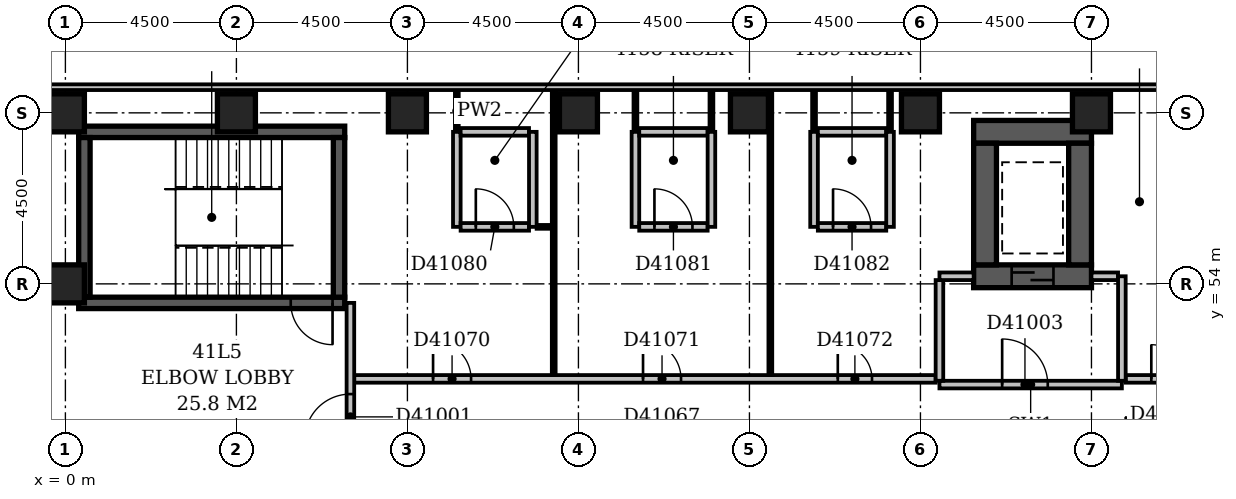
"""IFC4 building model, lengths in metres.
Left out: names, types, materials, properties, quantities, classifications, styles, units other than length and angle.
Written with IfcOpenShell. Run it as: python <this file> out.ifc"""

import sys

from ifc_helpers import new_model, si_unit, direction, frame, frame_2d, origin, origin_2d, place, context, subcontext, project, spatial, rectangle, extrude, element, fill, save


model = new_model("IFC4")
c1 = context("Model", 3, precision=1e-05, world=origin(), true_north=direction((0.0, 1.0)))
c2 = subcontext(c1, "Body", "Model", "MODEL_VIEW")
j1 = project(units=[si_unit("LENGTHUNIT", "METRE"), si_unit("PLANEANGLEUNIT", "RADIAN")], contexts=[c1])
p1 = place(None, origin())
s1 = spatial("IfcSite", under=j1, at=p1, CompositionType="ELEMENT")
p2 = place(p1, origin())
s2 = spatial("IfcBuilding", under=s1, at=p2, CompositionType="ELEMENT")
p3 = place(p2, frame((0.0, 0.0, 162.8)))
s3 = spatial("IfcBuildingStorey", under=s2, at=p3, CompositionType="ELEMENT", Elevation=162.8)
p4 = place(p3, frame((0.35, 53.5, -0.3), z_axis=(0.0, 0.0, 1.0), x_axis=(1.0, 0.0, 0.0)))
e1 = element("IfcWall", 1, at=p4, inside=s3, PredefinedType="SHEAR", context=c2, shape_type="SweptSolid", body=[
    extrude(rectangle(XDim=7.0, YDim=0.3, at=frame_2d((3.5, 0.0))), origin(), (0.0, 0.0, 1.0), 3.6),
])
p5 = place(p4, frame((5.58, 0.0, 0.3)))
e2 = element("IfcOpeningElement", 2, at=p5, cuts=e1, PredefinedType="OPENING", context=c2, shape_type="SweptSolid", body=[
    extrude(rectangle(XDim=1.1, YDim=2.1, at=frame_2d((0.55, 1.05))), frame((0.0, 0.162, 0.0), z_axis=(0.0, -1.0, 0.0), x_axis=(1.0, 0.0, 0.0)), (0.0, 0.0, 1.0), 0.324),
])
p6 = place(p3, frame((0.35, 58.0, -0.3), z_axis=(0.0, 0.0, 1.0), x_axis=(1.0, 0.0, 0.0)))
e3 = element("IfcWall", 3, at=p6, inside=s3, PredefinedType="SHEAR", context=c2, shape_type="SweptSolid", body=[
    extrude(rectangle(XDim=7.0, YDim=0.3, at=frame_2d((3.5, 0.0))), origin(), (0.0, 0.0, 1.0), 3.6),
])
for number, where, z_axis, x_axis in (
    (4, (0.5, 53.65, -0.3), (0.0, 0.0, 1.0), (0.0, 1.0, 0.0)),
    (5, (7.2, 53.65, -0.3), (0.0, 0.0, 1.0), (0.0, 1.0, 0.0)),
):
    element("IfcWall", number, at=place(p3, frame(where, z_axis=z_axis, x_axis=x_axis)), inside=s3, PredefinedType="SHEAR", context=c2, shape_type="SweptSolid", body=[
        extrude(rectangle(XDim=4.2, YDim=0.3, at=frame_2d((2.1, 0.0))), origin(), (0.0, 0.0, 1.0), 3.6),
    ])
p7 = place(p3, frame((23.9, 54.2, -0.3), z_axis=(0.0, 0.0, 1.0), x_axis=(1.0, 0.0, 0.0)))
e6 = element("IfcWall", 6, at=p7, inside=s3, PredefinedType="SHEAR", context=c2, shape_type="SweptSolid", body=[
    extrude(rectangle(XDim=3.1, YDim=0.6, at=frame_2d((1.55, 0.0))), origin(), (0.0, 0.0, 1.0), 3.6),
])
p8 = place(p7, frame((1.0, 0.0, 0.3)))
e7 = element("IfcOpeningElement", 7, at=p8, cuts=e6, PredefinedType="OPENING", context=c2, shape_type="SweptSolid", body=[
    extrude(rectangle(XDim=1.1, YDim=2.1, at=frame_2d((0.55, 1.05))), frame((0.0, 0.312, 0.0), z_axis=(0.0, -1.0, 0.0), x_axis=(1.0, 0.0, 0.0)), (0.0, 0.0, 1.0), 0.624),
])
p9 = place(p3, frame((23.9, 58.0, -0.3), z_axis=(0.0, 0.0, 1.0), x_axis=(1.0, 0.0, 0.0)))
e8 = element("IfcWall", 8, at=p9, inside=s3, PredefinedType="SHEAR", context=c2, shape_type="SweptSolid", body=[
    extrude(rectangle(XDim=3.1, YDim=0.6, at=frame_2d((1.55, 0.0))), origin(), (0.0, 0.0, 1.0), 3.6),
])
for number, where, z_axis, x_axis in (
    (9, (24.2, 54.5, -0.3), (0.0, 0.0, 1.0), (0.0, 1.0, 0.0)),
    (10, (26.7, 54.5, -0.3), (0.0, 0.0, 1.0), (0.0, 1.0, 0.0)),
):
    element("IfcWall", number, at=place(p3, frame(where, z_axis=z_axis, x_axis=x_axis)), inside=s3, PredefinedType="SHEAR", context=c2, shape_type="SweptSolid", body=[
        extrude(rectangle(XDim=3.2, YDim=0.6, at=frame_2d((1.6, 0.0))), origin(), (0.0, 0.0, 1.0), 3.6),
    ])
for number, where, z_axis, x_axis in (
    (11, (0.0, 54.0, -0.3), (0.0, 0.0, 1.0), (1.0, 0.0, 0.0)),
    (12, (0.0, 58.5, -0.3), (0.0, 0.0, 1.0), (1.0, 0.0, 0.0)),
    (13, (4.5, 58.5, -0.3), (0.0, 0.0, 1.0), (1.0, 0.0, 0.0)),
    (14, (9.0, 58.5, -0.3), (0.0, 0.0, 1.0), (1.0, 0.0, 0.0)),
    (15, (13.5, 58.5, -0.3), (0.0, 0.0, 1.0), (1.0, 0.0, 0.0)),
    (16, (18.0, 58.5, -0.3), (0.0, 0.0, 1.0), (1.0, 0.0, 0.0)),
    (17, (22.5, 58.5, -0.3), (0.0, 0.0, 1.0), (1.0, 0.0, 0.0)),
    (18, (27.0, 58.5, -0.3), (0.0, 0.0, 1.0), (1.0, 0.0, 0.0)),
):
    element("IfcColumn", number, at=place(p3, frame(where, z_axis=z_axis, x_axis=x_axis)), inside=s3, PredefinedType="COLUMN", context=c2, shape_type="SweptSolid", body=[
        extrude(rectangle(XDim=1.0, YDim=1.0, at=origin_2d()), origin(), (0.0, 0.0, 1.0), 3.6),
    ])
p10 = place(p3, frame((68.1, 59.175, 0.0), z_axis=(0.0, 0.0, 1.0), x_axis=(-1.0, 0.0, 0.0)))
e19 = element("IfcWall", 19, at=p10, inside=s3, PredefinedType="STANDARD", context=c2, shape_type="SweptSolid", body=[
    extrude(rectangle(XDim=68.85, YDim=0.15, at=frame_2d((34.425, 0.0))), origin(), (0.0, 0.0, 1.0), 2.7),
])
p11 = place(p10, frame((1.65, 0.0, 0.6)))
e20 = element("IfcOpeningElement", 20, at=p11, cuts=e19, PredefinedType="OPENING", context=c2, shape_type="SweptSolid", body=[
    extrude(rectangle(XDim=2.4, YDim=1.8, at=frame_2d((1.2, 0.9))), frame((0.0, 0.087, 0.0), z_axis=(0.0, -1.0, 0.0), x_axis=(1.0, 0.0, 0.0)), (0.0, 0.0, 1.0), 0.174),
])
p12 = place(p10, frame((6.15, 0.0, 0.6)))
e21 = element("IfcOpeningElement", 21, at=p12, cuts=e19, PredefinedType="OPENING", context=c2, shape_type="SweptSolid", body=[
    extrude(rectangle(XDim=2.4, YDim=1.8, at=frame_2d((1.2, 0.9))), frame((0.0, 0.087, 0.0), z_axis=(0.0, -1.0, 0.0), x_axis=(1.0, 0.0, 0.0)), (0.0, 0.0, 1.0), 0.174),
])
p13 = place(p10, frame((37.78, 0.0, 0.6)))
e22 = element("IfcOpeningElement", 22, at=p13, cuts=e19, PredefinedType="OPENING", context=c2, shape_type="SweptSolid", body=[
    extrude(rectangle(XDim=1.2, YDim=1.8, at=frame_2d((0.6, 0.9))), frame((0.0, 0.087, 0.0), z_axis=(0.0, -1.0, 0.0), x_axis=(1.0, 0.0, 0.0)), (0.0, 0.0, 1.0), 0.174),
])
p14 = place(p3, frame((23.0, 51.35, 0.0), z_axis=(0.0, 0.0, 1.0), x_axis=(1.0, 0.0, 0.0)))
e23 = element("IfcWall", 23, at=p14, inside=s3, PredefinedType="PARTITIONING", context=c2, shape_type="SweptSolid", body=[
    extrude(rectangle(XDim=4.8, YDim=0.2, at=frame_2d((2.4, 0.0))), origin(), (0.0, 0.0, 1.0), 3.3),
])
p15 = place(p14, frame((1.65, 0.0, 0.0)))
e24 = element("IfcOpeningElement", 24, at=p15, cuts=e23, PredefinedType="OPENING", context=c2, shape_type="SweptSolid", body=[
    extrude(rectangle(XDim=1.2, YDim=2.1, at=frame_2d((0.6, 1.05))), frame((0.0, 0.112, 0.0), z_axis=(0.0, -1.0, 0.0), x_axis=(1.0, 0.0, 0.0)), (0.0, 0.0, 1.0), 0.224),
])
p16 = place(p3, frame((27.8, 51.45, 0.0), z_axis=(0.0, 0.0, 1.0), x_axis=(0.0, 1.0, 0.0)))
e25 = element("IfcWall", 25, at=p16, inside=s3, PredefinedType="PARTITIONING", context=c2, shape_type="SweptSolid", body=[
    extrude(rectangle(XDim=2.75, YDim=0.2, at=frame_2d((1.375, 0.0))), origin(), (0.0, 0.0, 1.0), 3.3),
])
p17 = place(p3, frame((23.0, 54.2, 0.0), z_axis=(0.0, 0.0, 1.0), x_axis=(1.0, 0.0, 0.0)))
e26 = element("IfcWall", 26, at=p17, inside=s3, PredefinedType="PARTITIONING", context=c2, shape_type="SweptSolid", body=[
    extrude(rectangle(XDim=0.9, YDim=0.2, at=frame_2d((0.45, 0.0))), origin(), (0.0, 0.0, 1.0), 3.3),
])
p18 = place(p3, frame((27.0, 54.2, 0.0), z_axis=(0.0, 0.0, 1.0), x_axis=(1.0, 0.0, 0.0)))
e27 = element("IfcWall", 27, at=p18, inside=s3, PredefinedType="PARTITIONING", context=c2, shape_type="SweptSolid", body=[
    extrude(rectangle(XDim=0.7, YDim=0.2, at=frame_2d((0.35, 0.0))), origin(), (0.0, 0.0, 1.0), 3.3),
])
p19 = place(p3, frame((23.0, 51.45, 0.0), z_axis=(0.0, 0.0, 1.0), x_axis=(0.0, 1.0, 0.0)))
e28 = element("IfcWall", 28, at=p19, inside=s3, PredefinedType="PARTITIONING", context=c2, shape_type="SweptSolid", body=[
    extrude(rectangle(XDim=2.65, YDim=0.2, at=frame_2d((1.325, 0.0))), origin(), (0.0, 0.0, 1.0), 3.3),
])
p20 = place(p3, frame((7.5, 49.6, 0.0), z_axis=(0.0, 0.0, 1.0), x_axis=(0.0, 1.0, 0.0)))
e29 = element("IfcWall", 29, at=p20, inside=s3, PredefinedType="PARTITIONING", context=c2, shape_type="SweptSolid", body=[
    extrude(rectangle(XDim=3.9, YDim=0.2, at=frame_2d((1.95, 0.0))), origin(), (0.0, 0.0, 1.0), 3.3),
])
p21 = place(p20, frame((0.3, 0.0, 0.0)))
e30 = element("IfcOpeningElement", 30, at=p21, cuts=e29, PredefinedType="OPENING", context=c2, shape_type="SweptSolid", body=[
    extrude(rectangle(XDim=1.2, YDim=2.1, at=frame_2d((0.6, 1.05))), frame((0.0, 0.112, 0.0), z_axis=(0.0, -1.0, 0.0), x_axis=(1.0, 0.0, 0.0)), (0.0, 0.0, 1.0), 0.224),
])
p22 = place(p3, frame((7.6, 51.5, 0.0), z_axis=(0.0, 0.0, 1.0), x_axis=(1.0, 0.0, 0.0)))
e31 = element("IfcWall", 31, at=p22, inside=s3, PredefinedType="PARTITIONING", context=c2, shape_type="SweptSolid", body=[
    extrude(rectangle(XDim=15.3, YDim=0.2, at=frame_2d((7.65, 0.0))), origin(), (0.0, 0.0, 1.0), 3.3),
])
p23 = place(p22, frame((2.075, 0.0, 0.0)))
e32 = element("IfcOpeningElement", 32, at=p23, cuts=e31, PredefinedType="OPENING", context=c2, shape_type="SweptSolid", body=[
    extrude(rectangle(XDim=1.0, YDim=2.1, at=frame_2d((0.5, 1.05))), frame((0.0, 0.112, 0.0), z_axis=(0.0, -1.0, 0.0), x_axis=(1.0, 0.0, 0.0)), (0.0, 0.0, 1.0), 0.224),
])
p24 = place(p22, frame((7.6, 0.0, 0.0)))
e33 = element("IfcOpeningElement", 33, at=p24, cuts=e31, PredefinedType="OPENING", context=c2, shape_type="SweptSolid", body=[
    extrude(rectangle(XDim=1.0, YDim=2.1, at=frame_2d((0.5, 1.05))), frame((0.0, 0.112, 0.0), z_axis=(0.0, -1.0, 0.0), x_axis=(1.0, 0.0, 0.0)), (0.0, 0.0, 1.0), 0.224),
])
p25 = place(p22, frame((12.725, 0.0, 0.0)))
e34 = element("IfcOpeningElement", 34, at=p25, cuts=e31, PredefinedType="OPENING", context=c2, shape_type="SweptSolid", body=[
    extrude(rectangle(XDim=0.9, YDim=2.1, at=frame_2d((0.45, 1.05))), frame((0.0, 0.112, 0.0), z_axis=(0.0, -1.0, 0.0), x_axis=(1.0, 0.0, 0.0)), (0.0, 0.0, 1.0), 0.224),
])
p26 = place(p3, frame((27.9, 51.5, 0.0), z_axis=(0.0, 0.0, 1.0), x_axis=(1.0, 0.0, 0.0)))
e35 = element("IfcWall", 35, at=p26, inside=s3, PredefinedType="PARTITIONING", context=c2, shape_type="SweptSolid", body=[
    extrude(rectangle(XDim=9.3, YDim=0.2, at=frame_2d((4.65, 0.0))), origin(), (0.0, 0.0, 1.0), 3.3),
])
p27 = place(p26, frame((0.675, 0.0, 0.0)))
e36 = element("IfcOpeningElement", 36, at=p27, cuts=e35, PredefinedType="OPENING", context=c2, shape_type="SweptSolid", body=[
    extrude(rectangle(XDim=0.9, YDim=2.1, at=frame_2d((0.45, 1.05))), frame((0.0, 0.112, 0.0), z_axis=(0.0, -1.0, 0.0), x_axis=(1.0, 0.0, 0.0)), (0.0, 0.0, 1.0), 0.224),
])
p28 = place(p26, frame((3.6, 0.0, 0.0)))
e37 = element("IfcOpeningElement", 37, at=p28, cuts=e35, PredefinedType="OPENING", context=c2, shape_type="SweptSolid", body=[
    extrude(rectangle(XDim=1.0, YDim=2.1, at=frame_2d((0.5, 1.05))), frame((0.0, 0.112, 0.0), z_axis=(0.0, -1.0, 0.0), x_axis=(1.0, 0.0, 0.0)), (0.0, 0.0, 1.0), 0.224),
])
p29 = place(p26, frame((7.125, 0.0, 0.0)))
e38 = element("IfcOpeningElement", 38, at=p29, cuts=e35, PredefinedType="OPENING", context=c2, shape_type="SweptSolid", body=[
    extrude(rectangle(XDim=1.0, YDim=2.1, at=frame_2d((0.5, 1.05))), frame((0.0, 0.112, 0.0), z_axis=(0.0, -1.0, 0.0), x_axis=(1.0, 0.0, 0.0)), (0.0, 0.0, 1.0), 0.224),
])
for number, where, z_axis, x_axis in (
    (39, (12.85, 51.6, 0.0), (0.0, 0.0, 1.0), (0.0, 1.0, 0.0)),
    (40, (18.55, 51.6, 0.0), (0.0, 0.0, 1.0), (0.0, 1.0, 0.0)),
):
    element("IfcWall", number, at=place(p3, frame(where, z_axis=z_axis, x_axis=x_axis)), inside=s3, PredefinedType="PARTITIONING", context=c2, shape_type="SweptSolid", body=[
        extrude(rectangle(XDim=7.5, YDim=0.1, at=frame_2d((3.75, 0.0))), origin(), (0.0, 0.0, 1.0), 3.3),
    ])
p30 = place(p3, frame((10.3, 55.5, 0.0), z_axis=(0.0, 0.0, 1.0), x_axis=(0.0, 1.0, 0.0)))
e41 = element("IfcWall", 41, at=p30, inside=s3, PredefinedType="PARTITIONING", context=c2, shape_type="SweptSolid", body=[
    extrude(rectangle(XDim=2.5, YDim=0.2, at=frame_2d((1.25, 0.0))), origin(), (0.0, 0.0, 1.0), 3.3),
])
p31 = place(p3, frame((10.4, 55.5, 0.0), z_axis=(0.0, 0.0, 1.0), x_axis=(1.0, 0.0, 0.0)))
e42 = element("IfcWall", 42, at=p31, inside=s3, PredefinedType="PARTITIONING", context=c2, shape_type="SweptSolid", body=[
    extrude(rectangle(XDim=1.8, YDim=0.2, at=frame_2d((0.9, 0.0))), origin(), (0.0, 0.0, 1.0), 3.3),
])
p32 = place(p31, frame((0.4, 0.0, 0.0)))
e43 = element("IfcOpeningElement", 43, at=p32, cuts=e42, PredefinedType="OPENING", context=c2, shape_type="SweptSolid", body=[
    extrude(rectangle(XDim=1.0, YDim=2.1, at=frame_2d((0.5, 1.05))), frame((0.0, 0.112, 0.0), z_axis=(0.0, -1.0, 0.0), x_axis=(1.0, 0.0, 0.0)), (0.0, 0.0, 1.0), 0.224),
])
p33 = place(p3, frame((12.3, 55.5, 0.0), z_axis=(0.0, 0.0, 1.0), x_axis=(0.0, 1.0, 0.0)))
e44 = element("IfcWall", 44, at=p33, inside=s3, PredefinedType="PARTITIONING", context=c2, shape_type="SweptSolid", body=[
    extrude(rectangle(XDim=2.5, YDim=0.2, at=frame_2d((1.25, 0.0))), origin(), (0.0, 0.0, 1.0), 3.3),
])
p34 = place(p3, frame((12.4, 55.5, 0.0), z_axis=(0.0, 0.0, 1.0), x_axis=(1.0, 0.0, 0.0)))
e45 = element("IfcWall", 45, at=p34, inside=s3, PredefinedType="PARTITIONING", context=c2, shape_type="SweptSolid", body=[
    extrude(rectangle(XDim=0.4, YDim=0.1, at=frame_2d((0.2, 0.0))), origin(), (0.0, 0.0, 1.0), 3.3),
])
p35 = place(p3, frame((15.0, 55.5, 0.0), z_axis=(0.0, 0.0, 1.0), x_axis=(0.0, 1.0, 0.0)))
e46 = element("IfcWall", 46, at=p35, inside=s3, PredefinedType="PARTITIONING", context=c2, shape_type="SweptSolid", body=[
    extrude(rectangle(XDim=2.5, YDim=0.2, at=frame_2d((1.25, 0.0))), origin(), (0.0, 0.0, 1.0), 3.3),
])
p36 = place(p3, frame((15.1, 55.5, 0.0), z_axis=(0.0, 0.0, 1.0), x_axis=(1.0, 0.0, 0.0)))
e47 = element("IfcWall", 47, at=p36, inside=s3, PredefinedType="PARTITIONING", context=c2, shape_type="SweptSolid", body=[
    extrude(rectangle(XDim=1.8, YDim=0.2, at=frame_2d((0.9, 0.0))), origin(), (0.0, 0.0, 1.0), 3.3),
])
p37 = place(p36, frame((0.4, 0.0, 0.0)))
e48 = element("IfcOpeningElement", 48, at=p37, cuts=e47, PredefinedType="OPENING", context=c2, shape_type="SweptSolid", body=[
    extrude(rectangle(XDim=1.0, YDim=2.1, at=frame_2d((0.5, 1.05))), frame((0.0, 0.112, 0.0), z_axis=(0.0, -1.0, 0.0), x_axis=(1.0, 0.0, 0.0)), (0.0, 0.0, 1.0), 0.224),
])
for number, where, z_axis, x_axis in (
    (49, (17.0, 55.5, 0.0), (0.0, 0.0, 1.0), (0.0, 1.0, 0.0)),
    (50, (19.7, 55.5, 0.0), (0.0, 0.0, 1.0), (0.0, 1.0, 0.0)),
):
    element("IfcWall", number, at=place(p3, frame(where, z_axis=z_axis, x_axis=x_axis)), inside=s3, PredefinedType="PARTITIONING", context=c2, shape_type="SweptSolid", body=[
        extrude(rectangle(XDim=2.5, YDim=0.2, at=frame_2d((1.25, 0.0))), origin(), (0.0, 0.0, 1.0), 3.3),
    ])
p38 = place(p3, frame((19.8, 55.5, 0.0), z_axis=(0.0, 0.0, 1.0), x_axis=(1.0, 0.0, 0.0)))
e51 = element("IfcWall", 51, at=p38, inside=s3, PredefinedType="PARTITIONING", context=c2, shape_type="SweptSolid", body=[
    extrude(rectangle(XDim=1.8, YDim=0.2, at=frame_2d((0.9, 0.0))), origin(), (0.0, 0.0, 1.0), 3.3),
])
p39 = place(p38, frame((0.4, 0.0, 0.0)))
e52 = element("IfcOpeningElement", 52, at=p39, cuts=e51, PredefinedType="OPENING", context=c2, shape_type="SweptSolid", body=[
    extrude(rectangle(XDim=1.0, YDim=2.1, at=frame_2d((0.5, 1.05))), frame((0.0, 0.112, 0.0), z_axis=(0.0, -1.0, 0.0), x_axis=(1.0, 0.0, 0.0)), (0.0, 0.0, 1.0), 0.224),
])
p40 = place(p3, frame((21.7, 55.5, 0.0), z_axis=(0.0, 0.0, 1.0), x_axis=(0.0, 1.0, 0.0)))
e53 = element("IfcWall", 53, at=p40, inside=s3, PredefinedType="PARTITIONING", context=c2, shape_type="SweptSolid", body=[
    extrude(rectangle(XDim=2.5, YDim=0.2, at=frame_2d((1.25, 0.0))), origin(), (0.0, 0.0, 1.0), 3.3),
])
p41 = place(p3, frame((10.3, 58.0, 0.0), z_axis=(0.0, 0.0, 1.0), x_axis=(0.0, 1.0, 0.0)))
e54 = element("IfcWall", 54, at=p41, inside=s3, PredefinedType="PARTITIONING", context=c2, shape_type="SweptSolid", body=[
    extrude(rectangle(XDim=1.1, YDim=0.1, at=frame_2d((0.55, 0.0))), origin(), (0.0, 0.0, 1.0), 3.3),
])
p42 = place(p3, frame((10.4, 58.0, 0.0), z_axis=(0.0, 0.0, 1.0), x_axis=(1.0, 0.0, 0.0)))
e55 = element("IfcWall", 55, at=p42, inside=s3, PredefinedType="PARTITIONING", context=c2, shape_type="SweptSolid", body=[
    extrude(rectangle(XDim=1.8, YDim=0.2, at=frame_2d((0.9, 0.0))), origin(), (0.0, 0.0, 1.0), 3.3),
])
p43 = place(p3, frame((15.0, 58.0, 0.0), z_axis=(0.0, 0.0, 1.0), x_axis=(0.0, 1.0, 0.0)))
e56 = element("IfcWall", 56, at=p43, inside=s3, PredefinedType="PARTITIONING", context=c2, shape_type="SweptSolid", body=[
    extrude(rectangle(XDim=1.1, YDim=0.1, at=frame_2d((0.55, 0.0))), origin(), (0.0, 0.0, 1.0), 3.3),
])
p44 = place(p3, frame((15.1, 58.0, 0.0), z_axis=(0.0, 0.0, 1.0), x_axis=(1.0, 0.0, 0.0)))
e57 = element("IfcWall", 57, at=p44, inside=s3, PredefinedType="PARTITIONING", context=c2, shape_type="SweptSolid", body=[
    extrude(rectangle(XDim=1.8, YDim=0.2, at=frame_2d((0.9, 0.0))), origin(), (0.0, 0.0, 1.0), 3.3),
])
for number, where, z_axis, x_axis in (
    (58, (17.0, 58.0, 0.0), (0.0, 0.0, 1.0), (0.0, 1.0, 0.0)),
    (59, (19.7, 58.0, 0.0), (0.0, 0.0, 1.0), (0.0, 1.0, 0.0)),
):
    element("IfcWall", number, at=place(p3, frame(where, z_axis=z_axis, x_axis=x_axis)), inside=s3, PredefinedType="PARTITIONING", context=c2, shape_type="SweptSolid", body=[
        extrude(rectangle(XDim=1.1, YDim=0.1, at=frame_2d((0.55, 0.0))), origin(), (0.0, 0.0, 1.0), 3.3),
    ])
p45 = place(p3, frame((19.8, 58.0, 0.0), z_axis=(0.0, 0.0, 1.0), x_axis=(1.0, 0.0, 0.0)))
e60 = element("IfcWall", 60, at=p45, inside=s3, PredefinedType="PARTITIONING", context=c2, shape_type="SweptSolid", body=[
    extrude(rectangle(XDim=1.8, YDim=0.2, at=frame_2d((0.9, 0.0))), origin(), (0.0, 0.0, 1.0), 3.3),
])
p46 = place(p3, frame((21.7, 58.0, 0.0), z_axis=(0.0, 0.0, 1.0), x_axis=(0.0, 1.0, 0.0)))
e61 = element("IfcWall", 61, at=p46, inside=s3, PredefinedType="PARTITIONING", context=c2, shape_type="SweptSolid", body=[
    extrude(rectangle(XDim=1.1, YDim=0.1, at=frame_2d((0.55, 0.0))), origin(), (0.0, 0.0, 1.0), 3.3),
])
p47 = place(p21, origin())
e62 = element("IfcDoor", 62, at=p47, inside=s3, OperationType="SINGLE_SWING_LEFT", PredefinedType="DOOR", context=c2, shape_type="SweptSolid", body=[
    extrude(rectangle(XDim=1.2, YDim=2.1, at=frame_2d((0.6, 1.05))), frame((0.0, 0.025, 0.0), z_axis=(0.0, -1.0, 0.0), x_axis=(1.0, 0.0, 0.0)), (0.0, 0.0, 1.0), 0.05),
])
fill(e30, e62)
p48 = place(p15, origin())
e63 = element("IfcDoor", 63, at=p48, inside=s3, OperationType="SINGLE_SWING_LEFT", PredefinedType="DOOR", context=c2, shape_type="SweptSolid", body=[
    extrude(rectangle(XDim=1.2, YDim=2.1, at=frame_2d((0.6, 1.05))), frame((0.0, 0.025, 0.0), z_axis=(0.0, -1.0, 0.0), x_axis=(1.0, 0.0, 0.0)), (0.0, 0.0, 1.0), 0.05),
])
fill(e24, e63)
p49 = place(p8, origin())
e64 = element("IfcDoor", 64, at=p49, inside=s3, OperationType="SLIDING_TO_LEFT", PredefinedType="DOOR", context=c2, shape_type="SweptSolid", body=[
    extrude(rectangle(XDim=1.1, YDim=2.1, at=frame_2d((0.55, 1.05))), frame((0.0, 0.025, 0.0), z_axis=(0.0, -1.0, 0.0), x_axis=(1.0, 0.0, 0.0)), (0.0, 0.0, 1.0), 0.05),
])
fill(e7, e64)
p50 = place(p5, origin())
e65 = element("IfcDoor", 65, at=p50, inside=s3, OperationType="SINGLE_SWING_RIGHT", PredefinedType="DOOR", context=c2, shape_type="SweptSolid", body=[
    extrude(rectangle(XDim=1.1, YDim=2.1, at=frame_2d((0.55, 1.05))), frame((0.0, 0.025, 0.0), z_axis=(0.0, -1.0, 0.0), x_axis=(1.0, 0.0, 0.0)), (0.0, 0.0, 1.0), 0.05),
])
fill(e2, e65)
p51 = place(p23, origin())
e66 = element("IfcDoor", 66, at=p51, inside=s3, OperationType="SINGLE_SWING_LEFT", PredefinedType="DOOR", context=c2, shape_type="SweptSolid", body=[
    extrude(rectangle(XDim=1.0, YDim=2.1, at=frame_2d((0.5, 1.05))), frame((0.0, 0.025, 0.0), z_axis=(0.0, -1.0, 0.0), x_axis=(1.0, 0.0, 0.0)), (0.0, 0.0, 1.0), 0.05),
])
fill(e32, e66)
p52 = place(p24, origin())
e67 = element("IfcDoor", 67, at=p52, inside=s3, OperationType="SINGLE_SWING_LEFT", PredefinedType="DOOR", context=c2, shape_type="SweptSolid", body=[
    extrude(rectangle(XDim=1.0, YDim=2.1, at=frame_2d((0.5, 1.05))), frame((0.0, 0.025, 0.0), z_axis=(0.0, -1.0, 0.0), x_axis=(1.0, 0.0, 0.0)), (0.0, 0.0, 1.0), 0.05),
])
fill(e33, e67)
p53 = place(p25, origin())
e68 = element("IfcDoor", 68, at=p53, inside=s3, OperationType="SINGLE_SWING_LEFT", PredefinedType="DOOR", context=c2, shape_type="SweptSolid", body=[
    extrude(rectangle(XDim=0.9, YDim=2.1, at=frame_2d((0.45, 1.05))), frame((0.0, 0.025, 0.0), z_axis=(0.0, -1.0, 0.0), x_axis=(1.0, 0.0, 0.0)), (0.0, 0.0, 1.0), 0.05),
])
fill(e34, e68)
p54 = place(p27, origin())
e69 = element("IfcDoor", 69, at=p54, inside=s3, OperationType="SINGLE_SWING_LEFT", PredefinedType="DOOR", context=c2, shape_type="SweptSolid", body=[
    extrude(rectangle(XDim=0.9, YDim=2.1, at=frame_2d((0.45, 1.05))), frame((0.0, 0.025, 0.0), z_axis=(0.0, -1.0, 0.0), x_axis=(1.0, 0.0, 0.0)), (0.0, 0.0, 1.0), 0.05),
])
fill(e36, e69)
p55 = place(p32, origin())
e70 = element("IfcDoor", 70, at=p55, inside=s3, OperationType="SINGLE_SWING_LEFT", PredefinedType="DOOR", context=c2, shape_type="SweptSolid", body=[
    extrude(rectangle(XDim=1.0, YDim=2.1, at=frame_2d((0.5, 1.05))), frame((0.0, 0.025, 0.0), z_axis=(0.0, -1.0, 0.0), x_axis=(1.0, 0.0, 0.0)), (0.0, 0.0, 1.0), 0.05),
])
fill(e43, e70)
p56 = place(p37, origin())
e71 = element("IfcDoor", 71, at=p56, inside=s3, OperationType="SINGLE_SWING_LEFT", PredefinedType="DOOR", context=c2, shape_type="SweptSolid", body=[
    extrude(rectangle(XDim=1.0, YDim=2.1, at=frame_2d((0.5, 1.05))), frame((0.0, 0.025, 0.0), z_axis=(0.0, -1.0, 0.0), x_axis=(1.0, 0.0, 0.0)), (0.0, 0.0, 1.0), 0.05),
])
fill(e48, e71)
p57 = place(p39, origin())
e72 = element("IfcDoor", 72, at=p57, inside=s3, OperationType="SINGLE_SWING_LEFT", PredefinedType="DOOR", context=c2, shape_type="SweptSolid", body=[
    extrude(rectangle(XDim=1.0, YDim=2.1, at=frame_2d((0.5, 1.05))), frame((0.0, 0.025, 0.0), z_axis=(0.0, -1.0, 0.0), x_axis=(1.0, 0.0, 0.0)), (0.0, 0.0, 1.0), 0.05),
])
fill(e52, e72)
save(model, sys.argv[1])
